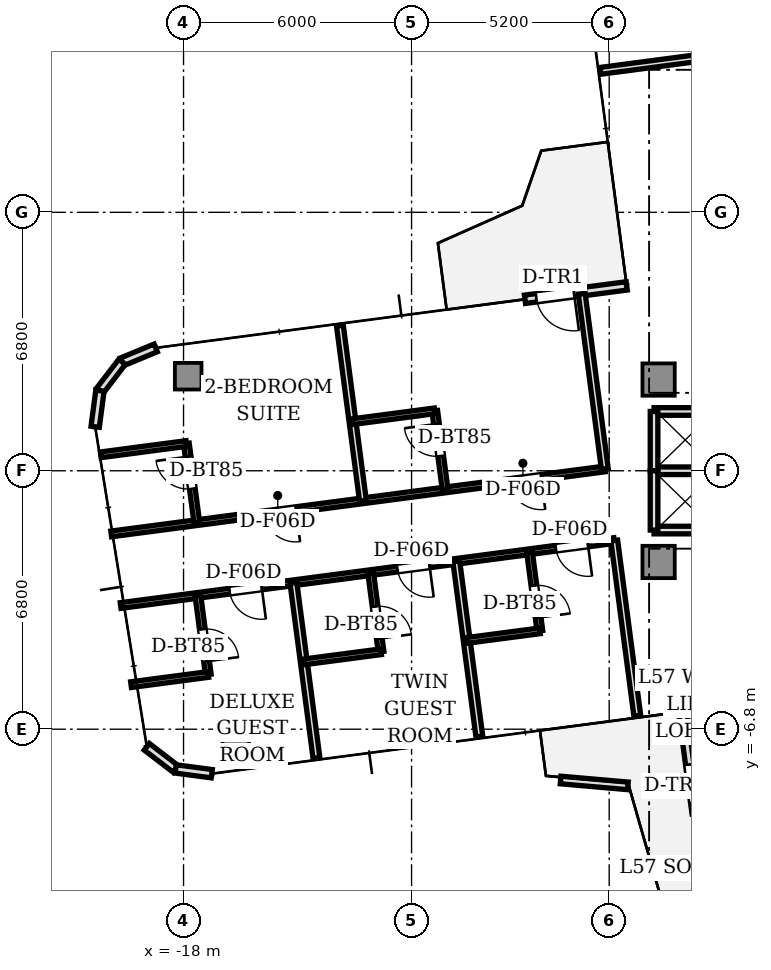
"""IFC4 building model, lengths in metres.
Left out: names, types, materials, properties, quantities, classifications, styles, units other than length and angle.
Written with IfcOpenShell. Run it as: python <this file> out.ifc"""

import sys

from ifc_helpers import new_model, si_unit, direction, frame, frame_2d, origin, origin_2d, place, context, subcontext, project, spatial, rectangle, extrude, source, transform, mapped, element, fill, save


model = new_model("IFC4")
c1 = context("Model", 3, precision=1e-05, world=origin(), true_north=direction((0.0, 1.0)))
c2 = subcontext(c1, "Body", "Model", "MODEL_VIEW")
j1 = project(units=[si_unit("LENGTHUNIT", "METRE"), si_unit("PLANEANGLEUNIT", "RADIAN")], contexts=[c1])
p1 = place(None, origin())
s1 = spatial("IfcSite", under=j1, at=p1, CompositionType="ELEMENT")
p2 = place(p1, origin())
s2 = spatial("IfcBuilding", under=s1, at=p2, CompositionType="ELEMENT")
p3 = place(p2, frame((0.0, 0.0, 206.5)))
s3 = spatial("IfcBuildingStorey", under=s2, at=p3, CompositionType="ELEMENT", Elevation=206.5)
m1 = source(origin(), c2, "Body", "SweptSolid", [
    extrude(rectangle(XDim=0.85, YDim=0.85, at=origin_2d()), origin(), (0.0, 0.0, 1.0), 3.11),
])
for number, where, z_axis, x_axis in (
    (1, (-5.5, 2.4, 0.0), (0.0, 0.0, 1.0), (1.0, 0.0, 0.0)),
    (2, (-5.5, -2.4, 0.0), (0.0, 0.0, 1.0), (1.0, 0.0, 0.0)),
):
    element("IfcColumn", number, at=place(p3, frame(where, z_axis=z_axis, x_axis=x_axis)), inside=s3, PredefinedType="COLUMN", context=c2, shape_type="MappedRepresentation", body=[
        mapped(m1, transform((0.0, 0.0, 0.0), scale=1.0)),
    ])
m2 = source(origin(), c2, "Body", "SweptSolid", [
    extrude(rectangle(XDim=0.7, YDim=0.7, at=origin_2d()), origin(), (0.0, 0.0, 1.0), 3.11),
])
for number, where, z_axis, x_axis in (
    (3, (-17.878, 2.488, 0.0), (0.0, 0.0, 1.0), (1.0, 0.0, 0.0)),
    (4, (-16.625, -7.03, 0.0), (0.0, 0.0, 1.0), (1.0, 0.0, 0.0)),
):
    element("IfcColumn", number, at=place(p3, frame(where, z_axis=z_axis, x_axis=x_axis)), inside=s3, PredefinedType="COLUMN", context=c2, shape_type="MappedRepresentation", body=[
        mapped(m2, transform((0.0, 0.0, 0.0), scale=1.0)),
    ])
p4 = place(p3, frame((-6.339, 4.864, 0.0), z_axis=(0.0, 0.0, 1.0), x_axis=(-0.991439824936, -0.130564442062, 0.0)))
e5 = element("IfcWall", 5, at=p4, inside=s3, PredefinedType="STANDARD", context=c2, shape_type="SweptSolid", body=[
    extrude(rectangle(XDim=2.7, YDim=0.22, at=frame_2d((1.35, 0.0))), origin(), (0.0, 0.0, 1.0), 3.11),
])
p5 = place(p4, frame((1.4, 0.0, 0.0)))
e6 = element("IfcOpeningElement", 6, at=p5, cuts=e5, PredefinedType="OPENING", context=c2, shape_type="SweptSolid", body=[
    extrude(rectangle(XDim=1.0, YDim=2.2, at=frame_2d((0.5, 1.1))), frame((0.0, 0.12, 0.0), z_axis=(0.0, -1.0, 0.0), x_axis=(1.0, 0.0, 0.0)), (0.0, 0.0, 1.0), 0.24),
])
for number, where, z_axis, x_axis in (
    (7, (-18.732, 3.233, 0.0), (0.0, 0.0, 1.0), (-0.924, -0.383, 0.0)),
    (8, (-19.617, 2.866, 0.0), (0.0, 0.0, 1.0), (-0.609, -0.793, 0.0)),
    (9, (-20.2, 2.106, 0.0), (0.0, 0.0, 1.0), (-0.131, -0.991, 0.0)),
):
    element("IfcWall", number, at=place(p3, frame(where, z_axis=z_axis, x_axis=x_axis)), inside=s3, PredefinedType="STANDARD", context=c2, shape_type="SweptSolid", body=[
        extrude(rectangle(XDim=0.958, YDim=0.22, at=frame_2d((0.479, 0.0))), origin(), (0.0, 0.0, 1.0), 3.11),
    ])
p6 = place(p3, frame((-18.966, -7.263, 0.0), z_axis=(0.0, 0.0, 1.0), x_axis=(0.793249178392, -0.608897151398, 0.0)))
e10 = element("IfcWall", 10, at=p6, inside=s3, PredefinedType="STANDARD", context=c2, shape_type="SweptSolid", body=[
    extrude(rectangle(XDim=0.958, YDim=0.22, at=frame_2d((0.479, 0.0))), origin(), (0.0, 0.0, 1.0), 3.11),
])
p7 = place(p3, frame((-18.207, -7.846, 0.0), z_axis=(0.0, 0.0, 1.0), x_axis=(0.991444747987, -0.130527053476, 0.0)))
e11 = element("IfcWall", 11, at=p7, inside=s3, PredefinedType="STANDARD", context=c2, shape_type="SweptSolid", body=[
    extrude(rectangle(XDim=0.958, YDim=0.22, at=frame_2d((0.479, 0.0))), origin(), (0.0, 0.0, 1.0), 3.11),
])
p8 = place(p3, frame((-4.864, -6.339, 0.0), z_axis=(0.0, 0.0, 1.0), x_axis=(0.130564442062, -0.991439824936, 0.0)))
e12 = element("IfcWall", 12, at=p8, inside=s3, PredefinedType="STANDARD", context=c2, shape_type="SweptSolid", body=[
    extrude(rectangle(XDim=2.7, YDim=0.22, at=frame_2d((1.35, 0.0))), origin(), (0.0, 0.0, 1.0), 3.11),
])
p9 = place(p8, frame((1.4, 0.0, 0.0)))
e13 = element("IfcOpeningElement", 13, at=p9, cuts=e12, PredefinedType="OPENING", context=c2, shape_type="SweptSolid", body=[
    extrude(rectangle(XDim=1.0, YDim=2.2, at=frame_2d((0.5, 1.1))), frame((0.0, 0.12, 0.0), z_axis=(0.0, -1.0, 0.0), x_axis=(1.0, 0.0, 0.0)), (0.0, 0.0, 1.0), 0.24),
])
p10 = place(p3, frame((-8.079, -8.137, 0.0), z_axis=(0.0, 0.0, 1.0), x_axis=(0.996227179606, -0.086783677121, 0.0)))
e14 = element("IfcWall", 14, at=p10, inside=s3, PredefinedType="PARAPET", context=c2, shape_type="SweptSolid", body=[
    extrude(rectangle(XDim=1.778, YDim=0.2, at=frame_2d((0.889, 0.0))), origin(), (0.0, 0.0, 1.0), 0.65),
])
for number, where, z_axis, x_axis in (
    (15, (-5.62, 1.56, 0.0), (0.0, 0.0, 1.0), (1.0, 0.0, 0.0)),
    (16, (-5.62, -1.56, 0.0), (0.0, 0.0, 1.0), (1.0, 0.0, 0.0)),
    (17, (-5.62, 0.0, 0.0), (0.0, 0.0, 1.0), (1.0, 0.0, 0.0)),
):
    element("IfcWall", number, at=place(p3, frame(where, z_axis=z_axis, x_axis=x_axis)), inside=s3, PredefinedType="SOLIDWALL", context=c2, shape_type="SweptSolid", body=[
        extrude(rectangle(XDim=1.64, YDim=0.2, at=frame_2d((0.82, 0.0))), origin(), (0.0, 0.0, 1.0), 2.66),
    ])
for number, where, z_axis, x_axis in (
    (18, (-5.62, 0.0, 0.0), (0.0, 0.0, 1.0), (0.0, 1.0, 0.0)),
    (19, (-5.62, -1.56, 0.0), (0.0, 0.0, 1.0), (0.0, 1.0, 0.0)),
):
    element("IfcWall", number, at=place(p3, frame(where, z_axis=z_axis, x_axis=x_axis)), inside=s3, PredefinedType="SOLIDWALL", context=c2, shape_type="SweptSolid", body=[
        extrude(rectangle(XDim=1.56, YDim=0.2, at=frame_2d((0.78, 0.0))), origin(), (0.0, 0.0, 1.0), 2.66),
    ])
p11 = place(p3, frame((-2.423, 11.129, 0.0), z_axis=(0.0, 0.0, 1.0), x_axis=(-0.991445715827, -0.13051970184, 0.0)))
e20 = element("IfcWall", 20, at=p11, inside=s3, PredefinedType="PARTITIONING", context=c2, shape_type="SweptSolid", body=[
    extrude(rectangle(XDim=4.65, YDim=0.18, at=frame_2d((2.325, 0.0))), origin(), (0.0, 0.0, 1.0), 2.66),
])
p12 = place(p3, frame((-6.667, -1.836, 0.0), z_axis=(0.0, 0.0, 1.0), x_axis=(-0.991444016182, -0.130532611928, 0.0)))
e21 = element("IfcWall", 21, at=p12, inside=s3, PredefinedType="PARTITIONING", context=c2, shape_type="SweptSolid", body=[
    extrude(rectangle(XDim=13.1, YDim=0.15, at=frame_2d((6.55, 0.0))), origin(), (0.0, 0.0, 1.0), 2.66),
])
p13 = place(p12, frame((0.7, 0.0, 0.0)))
e22 = element("IfcOpeningElement", 22, at=p13, cuts=e21, PredefinedType="OPENING", context=c2, shape_type="SweptSolid", body=[
    extrude(rectangle(XDim=0.85, YDim=2.1, at=frame_2d((0.425, 1.05))), frame((0.0, 0.085, 0.0), z_axis=(0.0, -1.0, 0.0), x_axis=(1.0, 0.0, 0.0)), (0.0, 0.0, 1.0), 0.17),
])
p14 = place(p12, frame((4.904, 0.0, 0.0)))
e23 = element("IfcOpeningElement", 23, at=p14, cuts=e21, PredefinedType="OPENING", context=c2, shape_type="SweptSolid", body=[
    extrude(rectangle(XDim=0.85, YDim=2.1, at=frame_2d((0.425, 1.05))), frame((0.0, 0.085, 0.0), z_axis=(0.0, -1.0, 0.0), x_axis=(1.0, 0.0, 0.0)), (0.0, 0.0, 1.0), 0.17),
])
p15 = place(p12, frame((9.357, 0.0, 0.0)))
e24 = element("IfcOpeningElement", 24, at=p15, cuts=e21, PredefinedType="OPENING", context=c2, shape_type="SweptSolid", body=[
    extrude(rectangle(XDim=0.85, YDim=2.1, at=frame_2d((0.425, 1.05))), frame((0.0, 0.085, 0.0), z_axis=(0.0, -1.0, 0.0), x_axis=(1.0, 0.0, 0.0)), (0.0, 0.0, 1.0), 0.17),
])
p16 = place(p3, frame((-6.915, 0.048, 0.0), z_axis=(0.0, 0.0, 1.0), x_axis=(-0.991444333722, -0.130530200068, 0.0)))
e25 = element("IfcWall", 25, at=p16, inside=s3, PredefinedType="PARTITIONING", context=c2, shape_type="SweptSolid", body=[
    extrude(rectangle(XDim=13.1, YDim=0.15, at=frame_2d((6.55, 0.0))), origin(), (0.0, 0.0, 1.0), 2.66),
])
p17 = place(p16, frame((1.693, 0.0, 0.0)))
e26 = element("IfcOpeningElement", 26, at=p17, cuts=e25, PredefinedType="OPENING", context=c2, shape_type="SweptSolid", body=[
    extrude(rectangle(XDim=0.85, YDim=2.1, at=frame_2d((0.425, 1.05))), frame((0.0, 0.085, 0.0), z_axis=(0.0, -1.0, 0.0), x_axis=(1.0, 0.0, 0.0)), (0.0, 0.0, 1.0), 0.17),
])
p18 = place(p16, frame((8.199, 0.0, 0.0)))
e27 = element("IfcOpeningElement", 27, at=p18, cuts=e25, PredefinedType="OPENING", context=c2, shape_type="SweptSolid", body=[
    extrude(rectangle(XDim=0.85, YDim=2.1, at=frame_2d((0.425, 1.05))), frame((0.0, 0.085, 0.0), z_axis=(0.0, -1.0, 0.0), x_axis=(1.0, 0.0, 0.0)), (0.0, 0.0, 1.0), 0.17),
])
p19 = place(p3, frame((-6.667, -1.836, 0.0), z_axis=(0.0, 0.0, 1.0), x_axis=(0.13051970184, -0.991445715827, 0.0)))
e28 = element("IfcWall", 28, at=p19, inside=s3, PredefinedType="PARTITIONING", context=c2, shape_type="SweptSolid", body=[
    extrude(rectangle(XDim=4.65, YDim=0.18, at=frame_2d((2.325, 0.0))), origin(), (0.0, 0.0, 1.0), 2.66),
])
p20 = place(p3, frame((-7.522, 4.658, 0.0), z_axis=(0.0, 0.0, 1.0), x_axis=(0.130526496103, -0.991444821367, 0.0)))
e29 = element("IfcWall", 29, at=p20, inside=s3, PredefinedType="PARTITIONING", context=c2, shape_type="SweptSolid", body=[
    extrude(rectangle(XDim=4.65, YDim=0.18, at=frame_2d((2.325, 0.0))), origin(), (0.0, 0.0, 1.0), 2.66),
])
p21 = place(p3, frame((-10.823, -2.383, 0.0), z_axis=(0.0, 0.0, 1.0), x_axis=(0.13051970184, -0.991445715827, 0.0)))
e30 = element("IfcWall", 30, at=p21, inside=s3, PredefinedType="PARTITIONING", context=c2, shape_type="SweptSolid", body=[
    extrude(rectangle(XDim=4.65, YDim=0.18, at=frame_2d((2.325, 0.0))), origin(), (0.0, 0.0, 1.0), 2.66),
])
p22 = place(p3, frame((-8.898, -2.13, 0.0), z_axis=(0.0, 0.0, 1.0), x_axis=(0.130556761174, -0.991440836415, 0.0)))
e31 = element("IfcWall", 31, at=p22, inside=s3, PredefinedType="PARTITIONING", context=c2, shape_type="SweptSolid", body=[
    extrude(rectangle(XDim=2.1, YDim=0.15, at=frame_2d((1.05, 0.0))), origin(), (0.0, 0.0, 1.0), 2.66),
])
p23 = place(p22, frame((0.9, 0.0, 0.0)))
e32 = element("IfcOpeningElement", 32, at=p23, cuts=e31, PredefinedType="OPENING", context=c2, shape_type="SweptSolid", body=[
    extrude(rectangle(XDim=0.85, YDim=2.1, at=frame_2d((0.425, 1.05))), frame((0.0, 0.085, 0.0), z_axis=(0.0, -1.0, 0.0), x_axis=(1.0, 0.0, 0.0)), (0.0, 0.0, 1.0), 0.17),
])
p24 = place(p3, frame((-8.624, -4.212, 0.0), z_axis=(0.0, 0.0, 1.0), x_axis=(-0.991448303632, -0.130500043009, 0.0)))
e33 = element("IfcWall", 33, at=p24, inside=s3, PredefinedType="PARTITIONING", context=c2, shape_type="SweptSolid", body=[
    extrude(rectangle(XDim=1.942, YDim=0.15, at=frame_2d((0.971, 0.0))), origin(), (0.0, 0.0, 1.0), 2.66),
])
p25 = place(p3, frame((-15.11, -2.948, 0.0), z_axis=(0.0, 0.0, 1.0), x_axis=(0.130526496103, -0.991444821367, 0.0)))
e34 = element("IfcWall", 34, at=p25, inside=s3, PredefinedType="PARTITIONING", context=c2, shape_type="SweptSolid", body=[
    extrude(rectangle(XDim=4.65, YDim=0.18, at=frame_2d((2.325, 0.0))), origin(), (0.0, 0.0, 1.0), 2.66),
])
p26 = place(p3, frame((-13.077, -2.68, 0.0), z_axis=(0.0, 0.0, 1.0), x_axis=(0.130541714651, -0.991442817683, 0.0)))
e35 = element("IfcWall", 35, at=p26, inside=s3, PredefinedType="PARTITIONING", context=c2, shape_type="SweptSolid", body=[
    extrude(rectangle(XDim=2.1, YDim=0.15, at=frame_2d((1.05, 0.0))), origin(), (0.0, 0.0, 1.0), 2.66),
])
p27 = place(p26, frame((0.9, 0.0, 0.0)))
e36 = element("IfcOpeningElement", 36, at=p27, cuts=e35, PredefinedType="OPENING", context=c2, shape_type="SweptSolid", body=[
    extrude(rectangle(XDim=0.85, YDim=2.1, at=frame_2d((0.425, 1.05))), frame((0.0, 0.085, 0.0), z_axis=(0.0, -1.0, 0.0), x_axis=(1.0, 0.0, 0.0)), (0.0, 0.0, 1.0), 0.17),
])
p28 = place(p3, frame((-12.803, -4.762, 0.0), z_axis=(0.0, 0.0, 1.0), x_axis=(-0.991460374844, -0.130408301556, 0.0)))
e37 = element("IfcWall", 37, at=p28, inside=s3, PredefinedType="PARTITIONING", context=c2, shape_type="SweptSolid", body=[
    extrude(rectangle(XDim=2.05, YDim=0.15, at=frame_2d((1.025, 0.0))), origin(), (0.0, 0.0, 1.0), 2.66),
])
p29 = place(p3, frame((-17.623, -3.278, 0.0), z_axis=(0.0, 0.0, 1.0), x_axis=(0.13044248305, -0.9914558783, 0.0)))
e38 = element("IfcWall", 38, at=p29, inside=s3, PredefinedType="PARTITIONING", context=c2, shape_type="SweptSolid", body=[
    extrude(rectangle(XDim=2.1, YDim=0.15, at=frame_2d((1.05, 0.0))), origin(), (0.0, 0.0, 1.0), 2.66),
])
p30 = place(p29, frame((0.9, 0.0, 0.0)))
e39 = element("IfcOpeningElement", 39, at=p30, cuts=e38, PredefinedType="OPENING", context=c2, shape_type="SweptSolid", body=[
    extrude(rectangle(XDim=0.85, YDim=2.1, at=frame_2d((0.425, 1.05))), frame((0.0, 0.085, 0.0), z_axis=(0.0, -1.0, 0.0), x_axis=(1.0, 0.0, 0.0)), (0.0, 0.0, 1.0), 0.17),
])
p31 = place(p3, frame((-17.349, -5.36, 0.0), z_axis=(0.0, 0.0, 1.0), x_axis=(-0.991442940586, -0.130540781221, 0.0)))
e40 = element("IfcWall", 40, at=p31, inside=s3, PredefinedType="PARTITIONING", context=c2, shape_type="SweptSolid", body=[
    extrude(rectangle(XDim=2.05, YDim=0.15, at=frame_2d((1.025, 0.0))), origin(), (0.0, 0.0, 1.0), 2.66),
])
p32 = place(p3, frame((-13.28, -0.79, 0.0), z_axis=(0.0, 0.0, 1.0), x_axis=(-0.130526496103, 0.991444821367, 0.0)))
e41 = element("IfcWall", 41, at=p32, inside=s3, PredefinedType="PARTITIONING", context=c2, shape_type="SweptSolid", body=[
    extrude(rectangle(XDim=4.65, YDim=0.18, at=frame_2d((2.325, 0.0))), origin(), (0.0, 0.0, 1.0), 2.66),
])
p33 = place(p3, frame((-11.116, -0.505, 0.0), z_axis=(0.0, 0.0, 1.0), x_axis=(-0.130541714651, 0.991442817683, 0.0)))
e42 = element("IfcWall", 42, at=p33, inside=s3, PredefinedType="PARTITIONING", context=c2, shape_type="SweptSolid", body=[
    extrude(rectangle(XDim=2.1, YDim=0.15, at=frame_2d((1.05, 0.0))), origin(), (0.0, 0.0, 1.0), 2.66),
])
p34 = place(p33, frame((0.9, 0.0, 0.0)))
e43 = element("IfcOpeningElement", 43, at=p34, cuts=e42, PredefinedType="OPENING", context=c2, shape_type="SweptSolid", body=[
    extrude(rectangle(XDim=0.85, YDim=2.1, at=frame_2d((0.425, 1.05))), frame((0.0, 0.085, 0.0), z_axis=(0.0, -1.0, 0.0), x_axis=(1.0, 0.0, 0.0)), (0.0, 0.0, 1.0), 0.17),
])
p35 = place(p3, frame((-11.39, 1.577, 0.0), z_axis=(0.0, 0.0, 1.0), x_axis=(-0.991438674405, -0.130573178313, 0.0)))
e44 = element("IfcWall", 44, at=p35, inside=s3, PredefinedType="PARTITIONING", context=c2, shape_type="SweptSolid", body=[
    extrude(rectangle(XDim=2.182, YDim=0.15, at=frame_2d((1.091, 0.0))), origin(), (0.0, 0.0, 1.0), 2.66),
])
p36 = place(p3, frame((-17.651, -1.365, 0.0), z_axis=(0.0, 0.0, 1.0), x_axis=(-0.13044248305, 0.9914558783, 0.0)))
e45 = element("IfcWall", 45, at=p36, inside=s3, PredefinedType="PARTITIONING", context=c2, shape_type="SweptSolid", body=[
    extrude(rectangle(XDim=2.1, YDim=0.15, at=frame_2d((1.05, 0.0))), origin(), (0.0, 0.0, 1.0), 2.63),
])
p37 = place(p36, frame((0.9, 0.0, 0.0)))
e46 = element("IfcOpeningElement", 46, at=p37, cuts=e45, PredefinedType="OPENING", context=c2, shape_type="SweptSolid", body=[
    extrude(rectangle(XDim=0.85, YDim=2.1, at=frame_2d((0.425, 1.05))), frame((0.0, 0.085, 0.0), z_axis=(0.0, -1.0, 0.0), x_axis=(1.0, 0.0, 0.0)), (0.0, 0.0, 1.0), 0.17),
])
p38 = place(p3, frame((-17.925, 0.717, 0.0), z_axis=(0.0, 0.0, 1.0), x_axis=(-0.991441490391, -0.130551794822, 0.0)))
e47 = element("IfcWall", 47, at=p38, inside=s3, PredefinedType="PARTITIONING", context=c2, shape_type="SweptSolid", body=[
    extrude(rectangle(XDim=2.272, YDim=0.15, at=frame_2d((1.136, 0.0))), origin(), (0.0, 0.0, 1.0), 2.66),
])
m3 = source(origin(), c2, "Body", "SweptSolid", [
    extrude(rectangle(XDim=1.0, YDim=0.05, at=origin_2d()), origin(), (0.0, 0.0, 1.0), 2.2),
])
p39 = place(p5, frame((0.5, 0.0, 0.0)))
e48 = element("IfcDoor", 48, at=p39, inside=s3, OperationType="SINGLE_SWING_LEFT", PredefinedType="DOOR", context=c2, shape_type="MappedRepresentation", body=[
    mapped(m3, transform((0.0, 0.0, 0.0), scale=1.0)),
])
fill(e6, e48)
p40 = place(p9, frame((0.5, 0.0, 0.0)))
e49 = element("IfcDoor", 49, at=p40, inside=s3, OperationType="SINGLE_SWING_LEFT", PredefinedType="DOOR", context=c2, shape_type="MappedRepresentation", body=[
    mapped(m3, transform((0.0, 0.0, 0.0), scale=1.0)),
])
fill(e13, e49)
m4 = source(origin(), c2, "Body", "SweptSolid", [
    extrude(rectangle(XDim=0.85, YDim=0.05, at=origin_2d()), origin(), (0.0, 0.0, 1.0), 2.1),
])
p41 = place(p23, frame((0.425, 0.0, 0.0)))
e50 = element("IfcDoor", 50, at=p41, inside=s3, OperationType="SINGLE_SWING_RIGHT", PredefinedType="DOOR", context=c2, shape_type="MappedRepresentation", body=[
    mapped(m4, transform((0.0, 0.0, 0.0), scale=1.0)),
])
fill(e32, e50)
p42 = place(p13, frame((0.425, 0.0, 0.0)))
e51 = element("IfcDoor", 51, at=p42, inside=s3, OperationType="SINGLE_SWING_LEFT", PredefinedType="DOOR", context=c2, shape_type="MappedRepresentation", body=[
    mapped(m4, transform((0.0, 0.0, 0.0), scale=1.0)),
])
fill(e22, e51)
p43 = place(p27, frame((0.425, 0.0, 0.0)))
e52 = element("IfcDoor", 52, at=p43, inside=s3, OperationType="SINGLE_SWING_RIGHT", PredefinedType="DOOR", context=c2, shape_type="MappedRepresentation", body=[
    mapped(m4, transform((0.0, 0.0, 0.0), scale=1.0)),
])
fill(e36, e52)
p44 = place(p14, frame((0.425, 0.0, 0.0)))
e53 = element("IfcDoor", 53, at=p44, inside=s3, OperationType="SINGLE_SWING_LEFT", PredefinedType="DOOR", context=c2, shape_type="MappedRepresentation", body=[
    mapped(m4, transform((0.0, 0.0, 0.0), scale=1.0)),
])
fill(e23, e53)
p45 = place(p30, frame((0.425, 0.0, 0.0)))
e54 = element("IfcDoor", 54, at=p45, inside=s3, OperationType="SINGLE_SWING_RIGHT", PredefinedType="DOOR", context=c2, shape_type="MappedRepresentation", body=[
    mapped(m4, transform((0.0, 0.0, 0.0), scale=1.0)),
])
fill(e39, e54)
p46 = place(p15, frame((0.425, 0.0, 0.0)))
e55 = element("IfcDoor", 55, at=p46, inside=s3, OperationType="SINGLE_SWING_LEFT", PredefinedType="DOOR", context=c2, shape_type="MappedRepresentation", body=[
    mapped(m4, transform((0.0, 0.0, 0.0), scale=1.0)),
])
fill(e24, e55)
p47 = place(p34, frame((0.425, 0.0, 0.0)))
e56 = element("IfcDoor", 56, at=p47, inside=s3, OperationType="SINGLE_SWING_RIGHT", PredefinedType="DOOR", context=c2, shape_type="MappedRepresentation", body=[
    mapped(m4, transform((0.0, 0.0, 0.0), scale=1.0)),
])
fill(e43, e56)
p48 = place(p17, frame((0.425, 0.0, 0.0)))
e57 = element("IfcDoor", 57, at=p48, inside=s3, OperationType="SINGLE_SWING_LEFT", PredefinedType="DOOR", context=c2, shape_type="MappedRepresentation", body=[
    mapped(m4, transform((0.0, 0.0, 0.0), scale=1.0)),
])
fill(e26, e57)
p49 = place(p37, frame((0.425, 0.0, 0.0)))
e58 = element("IfcDoor", 58, at=p49, inside=s3, OperationType="SINGLE_SWING_RIGHT", PredefinedType="DOOR", context=c2, shape_type="MappedRepresentation", body=[
    mapped(m4, transform((0.0, 0.0, 0.0), scale=1.0)),
])
fill(e46, e58)
p50 = place(p18, frame((0.425, 0.0, 0.0)))
e59 = element("IfcDoor", 59, at=p50, inside=s3, OperationType="SINGLE_SWING_LEFT", PredefinedType="DOOR", context=c2, shape_type="MappedRepresentation", body=[
    mapped(m4, transform((0.0, 0.0, 0.0), scale=1.0)),
])
fill(e27, e59)
save(model, sys.argv[1])
